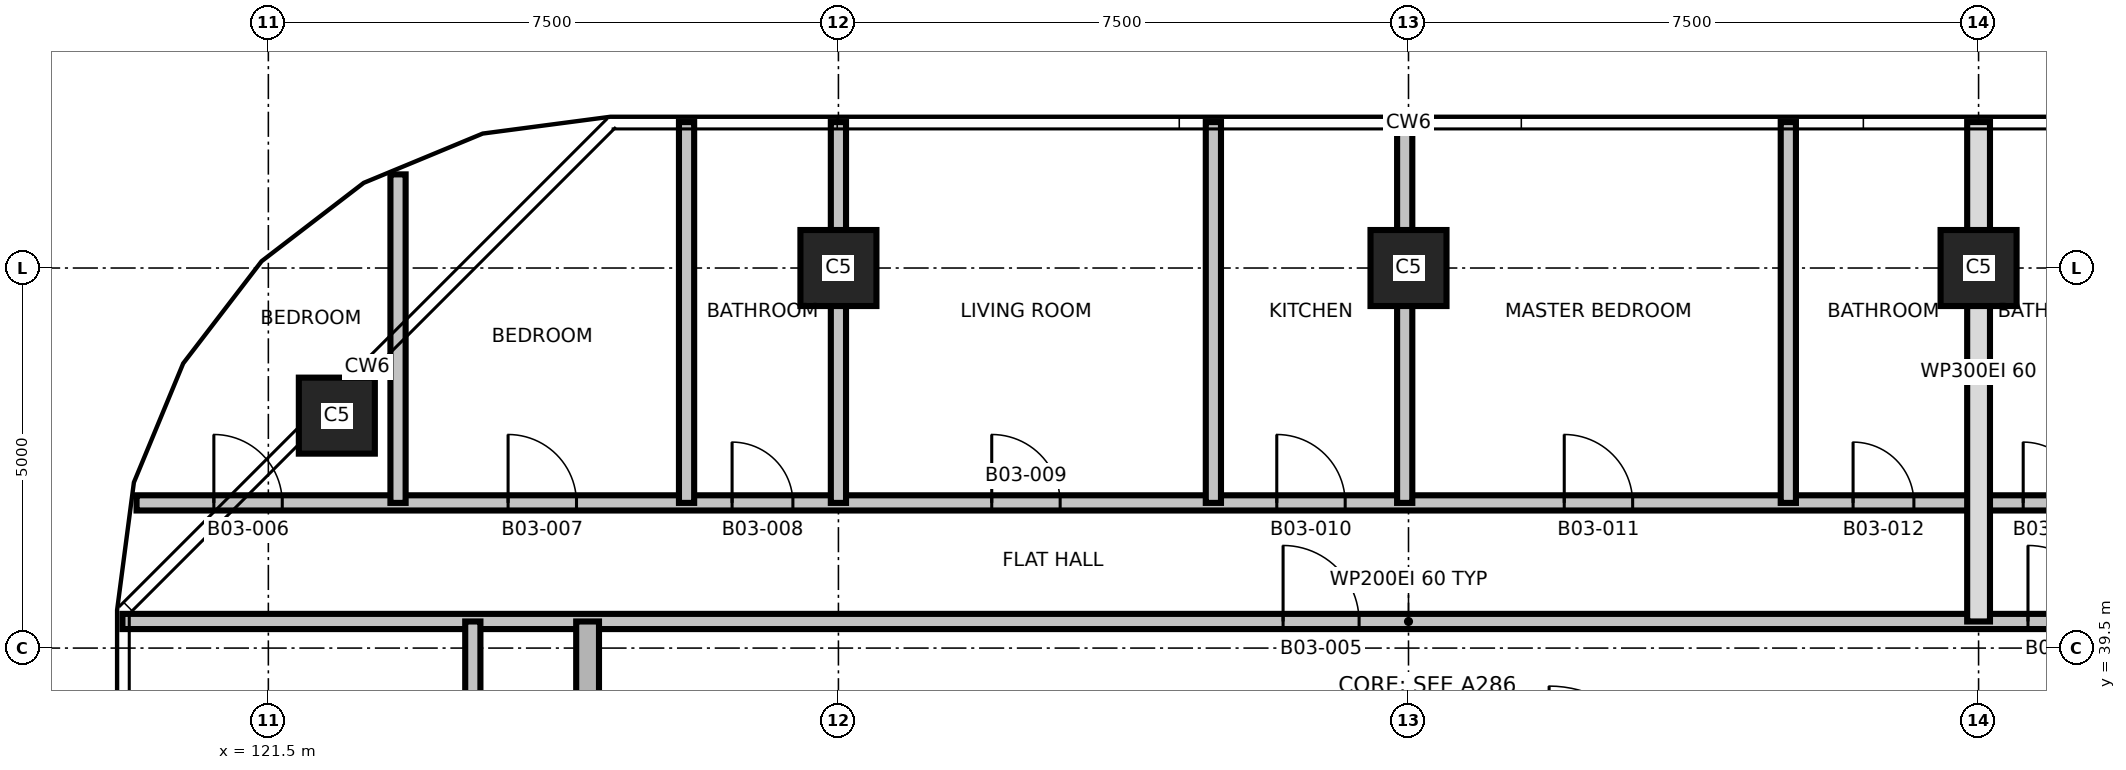
"""IFC4 building model, lengths in metres.
Left out: names, types, materials, properties, quantities, classifications, styles, units other than length and angle.
Written with IfcOpenShell. Run it as: python <this file> out.ifc"""

import sys

from ifc_helpers import new_model, si_unit, direction, frame, frame_2d, origin, origin_2d, place, context, subcontext, project, spatial, rectangle, extrude, element, fill, save


model = new_model("IFC4")
c1 = context("Model", 3, precision=1e-05, world=origin(), true_north=direction((0.0, 1.0)))
c2 = subcontext(c1, "Body", "Model", "MODEL_VIEW")
j1 = project(units=[si_unit("LENGTHUNIT", "METRE"), si_unit("PLANEANGLEUNIT", "RADIAN")], contexts=[c1])
p1 = place(None, origin())
s1 = spatial("IfcSite", under=j1, at=p1, CompositionType="ELEMENT")
p2 = place(p1, origin())
s2 = spatial("IfcBuilding", under=s1, at=p2, CompositionType="ELEMENT")
p3 = place(p2, frame((0.0, 0.0, 55.7)))
s3 = spatial("IfcBuildingStorey", under=s2, at=p3, CompositionType="ELEMENT", Elevation=55.7)
for number, where, z_axis, x_axis in (
    (1, (122.401, 42.558, 0.0), (0.0, 0.0, 1.0), (1.0, 0.0, 0.0)),
    (2, (129.0, 44.5, 0.0), (0.0, 0.0, 1.0), (1.0, 0.0, 0.0)),
    (3, (136.5, 44.5, 0.0), (0.0, 0.0, 1.0), (1.0, 0.0, 0.0)),
    (4, (144.0, 44.5, 0.0), (0.0, 0.0, 1.0), (1.0, 0.0, 0.0)),
):
    element("IfcColumn", number, at=place(p3, frame(where, z_axis=z_axis, x_axis=x_axis)), inside=s3, PredefinedType="COLUMN", context=c2, shape_type="SweptSolid", body=[
        extrude(rectangle(XDim=1.0, YDim=1.0, at=origin_2d()), origin(), (0.0, 0.0, 1.0), 3.7),
    ])
p4 = place(p3, frame((119.58, 39.85, 0.0), z_axis=(0.0, 0.0, 1.0), x_axis=(1.0, 0.0, 0.0)))
e5 = element("IfcWall", 5, at=p4, inside=s3, PredefinedType="PARTITIONING", context=c2, shape_type="SweptSolid", body=[
    extrude(rectangle(XDim=33.84, YDim=0.2, at=frame_2d((16.92, 0.0))), origin(), (0.0, 0.0, 1.0), 3.4),
])
p5 = place(p4, frame((15.27, 0.0, 0.0)))
e6 = element("IfcOpeningElement", 6, at=p5, cuts=e5, PredefinedType="OPENING", context=c2, shape_type="SweptSolid", body=[
    extrude(rectangle(XDim=1.0, YDim=2.1, at=frame_2d((0.5, 1.05))), frame((0.0, 0.11, 0.0), z_axis=(0.0, -1.0, 0.0), x_axis=(1.0, 0.0, 0.0)), (0.0, 0.0, 1.0), 0.22),
])
p6 = place(p4, frame((25.07, 0.0, 0.0)))
e7 = element("IfcOpeningElement", 7, at=p6, cuts=e5, PredefinedType="OPENING", context=c2, shape_type="SweptSolid", body=[
    extrude(rectangle(XDim=1.0, YDim=2.1, at=frame_2d((0.5, 1.05))), frame((0.0, 0.11, 0.0), z_axis=(0.0, -1.0, 0.0), x_axis=(1.0, 0.0, 0.0)), (0.0, 0.0, 1.0), 0.22),
])
p7 = place(p3, frame((119.766, 41.41, 0.0), z_axis=(0.0, 0.0, 1.0), x_axis=(1.0, 0.0, 0.0)))
e8 = element("IfcWall", 8, at=p7, inside=s3, PredefinedType="PARTITIONING", context=c2, shape_type="SweptSolid", body=[
    extrude(rectangle(XDim=33.468, YDim=0.2, at=frame_2d((16.734, 0.0))), origin(), (0.0, 0.0, 1.0), 3.4),
])
p8 = place(p7, frame((1.017, 0.0, 0.0)))
e9 = element("IfcOpeningElement", 9, at=p8, cuts=e8, PredefinedType="OPENING", context=c2, shape_type="SweptSolid", body=[
    extrude(rectangle(XDim=0.9, YDim=2.1, at=frame_2d((0.45, 1.05))), frame((0.0, 0.11, 0.0), z_axis=(0.0, -1.0, 0.0), x_axis=(1.0, 0.0, 0.0)), (0.0, 0.0, 1.0), 0.22),
])
p9 = place(p7, frame((4.888, 0.0, 0.0)))
e10 = element("IfcOpeningElement", 10, at=p9, cuts=e8, PredefinedType="OPENING", context=c2, shape_type="SweptSolid", body=[
    extrude(rectangle(XDim=0.9, YDim=2.1, at=frame_2d((0.45, 1.05))), frame((0.0, 0.11, 0.0), z_axis=(0.0, -1.0, 0.0), x_axis=(1.0, 0.0, 0.0)), (0.0, 0.0, 1.0), 0.22),
])
p10 = place(p7, frame((7.835, 0.0, 0.0)))
e11 = element("IfcOpeningElement", 11, at=p10, cuts=e8, PredefinedType="OPENING", context=c2, shape_type="SweptSolid", body=[
    extrude(rectangle(XDim=0.8, YDim=2.1, at=frame_2d((0.4, 1.05))), frame((0.0, 0.11, 0.0), z_axis=(0.0, -1.0, 0.0), x_axis=(1.0, 0.0, 0.0)), (0.0, 0.0, 1.0), 0.22),
])
p11 = place(p7, frame((11.251, 0.0, 0.0)))
e12 = element("IfcOpeningElement", 12, at=p11, cuts=e8, PredefinedType="OPENING", context=c2, shape_type="SweptSolid", body=[
    extrude(rectangle(XDim=0.9, YDim=2.1, at=frame_2d((0.45, 1.05))), frame((0.0, 0.11, 0.0), z_axis=(0.0, -1.0, 0.0), x_axis=(1.0, 0.0, 0.0)), (0.0, 0.0, 1.0), 0.22),
])
p12 = place(p7, frame((15.001, 0.0, 0.0)))
e13 = element("IfcOpeningElement", 13, at=p12, cuts=e8, PredefinedType="OPENING", context=c2, shape_type="SweptSolid", body=[
    extrude(rectangle(XDim=0.9, YDim=2.1, at=frame_2d((0.45, 1.05))), frame((0.0, 0.11, 0.0), z_axis=(0.0, -1.0, 0.0), x_axis=(1.0, 0.0, 0.0)), (0.0, 0.0, 1.0), 0.22),
])
p13 = place(p7, frame((18.783, 0.0, 0.0)))
e14 = element("IfcOpeningElement", 14, at=p13, cuts=e8, PredefinedType="OPENING", context=c2, shape_type="SweptSolid", body=[
    extrude(rectangle(XDim=0.9, YDim=2.1, at=frame_2d((0.45, 1.05))), frame((0.0, 0.11, 0.0), z_axis=(0.0, -1.0, 0.0), x_axis=(1.0, 0.0, 0.0)), (0.0, 0.0, 1.0), 0.22),
])
p14 = place(p7, frame((22.583, 0.0, 0.0)))
e15 = element("IfcOpeningElement", 15, at=p14, cuts=e8, PredefinedType="OPENING", context=c2, shape_type="SweptSolid", body=[
    extrude(rectangle(XDim=0.8, YDim=2.1, at=frame_2d((0.4, 1.05))), frame((0.0, 0.11, 0.0), z_axis=(0.0, -1.0, 0.0), x_axis=(1.0, 0.0, 0.0)), (0.0, 0.0, 1.0), 0.22),
])
p15 = place(p7, frame((24.821, 0.0, 0.0)))
e16 = element("IfcOpeningElement", 16, at=p15, cuts=e8, PredefinedType="OPENING", context=c2, shape_type="SweptSolid", body=[
    extrude(rectangle(XDim=0.8, YDim=2.1, at=frame_2d((0.4, 1.05))), frame((0.0, 0.11, 0.0), z_axis=(0.0, -1.0, 0.0), x_axis=(1.0, 0.0, 0.0)), (0.0, 0.0, 1.0), 0.22),
])
p16 = place(p7, frame((26.923, 0.0, 0.0)))
e17 = element("IfcOpeningElement", 17, at=p16, cuts=e8, PredefinedType="OPENING", context=c2, shape_type="SweptSolid", body=[
    extrude(rectangle(XDim=0.9, YDim=2.1, at=frame_2d((0.45, 1.05))), frame((0.0, 0.11, 0.0), z_axis=(0.0, -1.0, 0.0), x_axis=(1.0, 0.0, 0.0)), (0.0, 0.0, 1.0), 0.22),
])
p17 = place(p7, frame((31.556, 0.0, 0.0)))
e18 = element("IfcOpeningElement", 18, at=p17, cuts=e8, PredefinedType="OPENING", context=c2, shape_type="SweptSolid", body=[
    extrude(rectangle(XDim=0.9, YDim=2.1, at=frame_2d((0.45, 1.05))), frame((0.0, 0.11, 0.0), z_axis=(0.0, -1.0, 0.0), x_axis=(1.0, 0.0, 0.0)), (0.0, 0.0, 1.0), 0.22),
])
p18 = place(p3, frame((123.206, 41.41, 0.0), z_axis=(0.0, 0.0, 1.0), x_axis=(0.0, 1.0, 0.0)))
e19 = element("IfcWall", 19, at=p18, inside=s3, PredefinedType="PARTITIONING", context=c2, shape_type="SweptSolid", body=[
    extrude(rectangle(XDim=4.322, YDim=0.2, at=frame_2d((2.161, 0.0))), origin(), (0.0, 0.0, 1.0), 3.4),
])
p19 = place(p3, frame((124.19, 22.15, 0.0), z_axis=(0.0, 0.0, 1.0), x_axis=(0.0, 1.0, 0.0)))
e20 = element("IfcWall", 20, at=p19, inside=s3, PredefinedType="PARTITIONING", context=c2, shape_type="SweptSolid", body=[
    extrude(rectangle(XDim=17.7, YDim=0.2, at=frame_2d((8.85, 0.0))), origin(), (0.0, 0.0, 1.0), 3.4),
])
p20 = place(p19, frame((1.028, 0.0, 0.0)))
e21 = element("IfcOpeningElement", 21, at=p20, cuts=e20, PredefinedType="OPENING", context=c2, shape_type="SweptSolid", body=[
    extrude(rectangle(XDim=0.9, YDim=2.1, at=frame_2d((0.45, 1.05))), frame((0.0, 0.11, 0.0), z_axis=(0.0, -1.0, 0.0), x_axis=(1.0, 0.0, 0.0)), (0.0, 0.0, 1.0), 0.22),
])
p21 = place(p19, frame((3.253, 0.0, 0.0)))
e22 = element("IfcOpeningElement", 22, at=p21, cuts=e20, PredefinedType="OPENING", context=c2, shape_type="SweptSolid", body=[
    extrude(rectangle(XDim=0.8, YDim=2.1, at=frame_2d((0.4, 1.05))), frame((0.0, 0.11, 0.0), z_axis=(0.0, -1.0, 0.0), x_axis=(1.0, 0.0, 0.0)), (0.0, 0.0, 1.0), 0.22),
])
p22 = place(p19, frame((6.867, 0.0, 0.0)))
e23 = element("IfcOpeningElement", 23, at=p22, cuts=e20, PredefinedType="OPENING", context=c2, shape_type="SweptSolid", body=[
    extrude(rectangle(XDim=0.9, YDim=2.1, at=frame_2d((0.45, 1.05))), frame((0.0, 0.11, 0.0), z_axis=(0.0, -1.0, 0.0), x_axis=(1.0, 0.0, 0.0)), (0.0, 0.0, 1.0), 0.22),
])
p23 = place(p19, frame((11.367, 0.0, 0.0)))
e24 = element("IfcOpeningElement", 24, at=p23, cuts=e20, PredefinedType="OPENING", context=c2, shape_type="SweptSolid", body=[
    extrude(rectangle(XDim=0.9, YDim=2.1, at=frame_2d((0.45, 1.05))), frame((0.0, 0.11, 0.0), z_axis=(0.0, -1.0, 0.0), x_axis=(1.0, 0.0, 0.0)), (0.0, 0.0, 1.0), 0.22),
])
p24 = place(p19, frame((15.075, 0.0, 0.0)))
e25 = element("IfcOpeningElement", 25, at=p24, cuts=e20, PredefinedType="OPENING", context=c2, shape_type="SweptSolid", body=[
    extrude(rectangle(XDim=0.9, YDim=2.1, at=frame_2d((0.45, 1.05))), frame((0.0, 0.11, 0.0), z_axis=(0.0, -1.0, 0.0), x_axis=(1.0, 0.0, 0.0)), (0.0, 0.0, 1.0), 0.22),
])
p25 = place(p3, frame((125.7, 22.15, 0.0), z_axis=(0.0, 0.0, 1.0), x_axis=(0.0, 1.0, 0.0)))
e26 = element("IfcWall", 26, at=p25, inside=s3, PredefinedType="SHEAR", context=c2, shape_type="SweptSolid", body=[
    extrude(rectangle(XDim=17.7, YDim=0.3, at=frame_2d((8.85, 0.0))), origin(), (0.0, 0.0, 1.0), 3.4),
])
p26 = place(p25, frame((2.7, 0.0, 0.0)))
e27 = element("IfcOpeningElement", 27, at=p26, cuts=e26, PredefinedType="OPENING", context=c2, shape_type="SweptSolid", body=[
    extrude(rectangle(XDim=1.0, YDim=2.1, at=frame_2d((0.5, 1.05))), frame((0.0, 0.16, 0.0), z_axis=(0.0, -1.0, 0.0), x_axis=(1.0, 0.0, 0.0)), (0.0, 0.0, 1.0), 0.32),
])
for number, where, z_axis, x_axis in (
    (28, (127.002, 41.41, 0.0), (0.0, 0.0, 1.0), (0.0, 1.0, 0.0)),
    (29, (129.0, 41.41, 0.0), (0.0, 0.0, 1.0), (0.0, 1.0, 0.0)),
    (30, (133.933, 41.41, 0.0), (0.0, 0.0, 1.0), (0.0, 1.0, 0.0)),
    (31, (136.45, 41.41, 0.0), (0.0, 0.0, 1.0), (0.0, 1.0, 0.0)),
    (32, (141.497, 41.41, 0.0), (0.0, 0.0, 1.0), (0.0, 1.0, 0.0)),
):
    element("IfcWall", number, at=place(p3, frame(where, z_axis=z_axis, x_axis=x_axis)), inside=s3, PredefinedType="PARTITIONING", context=c2, shape_type="SweptSolid", body=[
        extrude(rectangle(XDim=5.01, YDim=0.2, at=frame_2d((2.505, 0.0))), origin(), (0.0, 0.0, 1.0), 3.4),
    ])
p27 = place(p3, frame((144.0, 39.85, 0.0), z_axis=(0.0, 0.0, 1.0), x_axis=(0.0, 1.0, 0.0)))
e33 = element("IfcWall", 33, at=p27, inside=s3, PredefinedType="PARTITIONING", context=c2, shape_type="SweptSolid", body=[
    extrude(rectangle(XDim=6.57, YDim=0.3, at=frame_2d((3.285, 0.0))), origin(), (0.0, 0.0, 1.0), 3.4),
])
p28 = place(p5, origin())
e34 = element("IfcDoor", 34, at=p28, inside=s3, OperationType="SINGLE_SWING_LEFT", PredefinedType="DOOR", context=c2, shape_type="SweptSolid", body=[
    extrude(rectangle(XDim=1.0, YDim=2.1, at=frame_2d((0.5, 1.05))), frame((0.0, 0.025, 0.0), z_axis=(0.0, -1.0, 0.0), x_axis=(1.0, 0.0, 0.0)), (0.0, 0.0, 1.0), 0.05),
])
fill(e6, e34)
p29 = place(p8, origin())
e35 = element("IfcDoor", 35, at=p29, inside=s3, OperationType="SINGLE_SWING_RIGHT", PredefinedType="DOOR", context=c2, shape_type="SweptSolid", body=[
    extrude(rectangle(XDim=0.9, YDim=2.1, at=frame_2d((0.45, 1.05))), frame((0.0, 0.025, 0.0), z_axis=(0.0, -1.0, 0.0), x_axis=(1.0, 0.0, 0.0)), (0.0, 0.0, 1.0), 0.05),
])
fill(e9, e35)
p30 = place(p9, origin())
e36 = element("IfcDoor", 36, at=p30, inside=s3, OperationType="SINGLE_SWING_LEFT", PredefinedType="DOOR", context=c2, shape_type="SweptSolid", body=[
    extrude(rectangle(XDim=0.9, YDim=2.1, at=frame_2d((0.45, 1.05))), frame((0.0, 0.025, 0.0), z_axis=(0.0, -1.0, 0.0), x_axis=(1.0, 0.0, 0.0)), (0.0, 0.0, 1.0), 0.05),
])
fill(e10, e36)
p31 = place(p10, origin())
e37 = element("IfcDoor", 37, at=p31, inside=s3, OperationType="SINGLE_SWING_RIGHT", PredefinedType="DOOR", context=c2, shape_type="SweptSolid", body=[
    extrude(rectangle(XDim=0.8, YDim=2.1, at=frame_2d((0.4, 1.05))), frame((0.0, 0.025, 0.0), z_axis=(0.0, -1.0, 0.0), x_axis=(1.0, 0.0, 0.0)), (0.0, 0.0, 1.0), 0.05),
])
fill(e11, e37)
p32 = place(p11, origin())
e38 = element("IfcDoor", 38, at=p32, inside=s3, OperationType="SINGLE_SWING_LEFT", PredefinedType="DOOR", context=c2, shape_type="SweptSolid", body=[
    extrude(rectangle(XDim=0.9, YDim=2.1, at=frame_2d((0.45, 1.05))), frame((0.0, 0.025, 0.0), z_axis=(0.0, -1.0, 0.0), x_axis=(1.0, 0.0, 0.0)), (0.0, 0.0, 1.0), 0.05),
])
fill(e12, e38)
p33 = place(p12, origin())
e39 = element("IfcDoor", 39, at=p33, inside=s3, OperationType="SINGLE_SWING_RIGHT", PredefinedType="DOOR", context=c2, shape_type="SweptSolid", body=[
    extrude(rectangle(XDim=0.9, YDim=2.1, at=frame_2d((0.45, 1.05))), frame((0.0, 0.025, 0.0), z_axis=(0.0, -1.0, 0.0), x_axis=(1.0, 0.0, 0.0)), (0.0, 0.0, 1.0), 0.05),
])
fill(e13, e39)
p34 = place(p13, origin())
e40 = element("IfcDoor", 40, at=p34, inside=s3, OperationType="SINGLE_SWING_LEFT", PredefinedType="DOOR", context=c2, shape_type="SweptSolid", body=[
    extrude(rectangle(XDim=0.9, YDim=2.1, at=frame_2d((0.45, 1.05))), frame((0.0, 0.025, 0.0), z_axis=(0.0, -1.0, 0.0), x_axis=(1.0, 0.0, 0.0)), (0.0, 0.0, 1.0), 0.05),
])
fill(e14, e40)
p35 = place(p14, origin())
e41 = element("IfcDoor", 41, at=p35, inside=s3, OperationType="SINGLE_SWING_RIGHT", PredefinedType="DOOR", context=c2, shape_type="SweptSolid", body=[
    extrude(rectangle(XDim=0.8, YDim=2.1, at=frame_2d((0.4, 1.05))), frame((0.0, 0.025, 0.0), z_axis=(0.0, -1.0, 0.0), x_axis=(1.0, 0.0, 0.0)), (0.0, 0.0, 1.0), 0.05),
])
fill(e15, e41)
p36 = place(p6, origin())
e42 = element("IfcDoor", 42, at=p36, inside=s3, OperationType="SINGLE_SWING_LEFT", PredefinedType="DOOR", context=c2, shape_type="SweptSolid", body=[
    extrude(rectangle(XDim=1.0, YDim=2.1, at=frame_2d((0.5, 1.05))), frame((0.0, 0.025, 0.0), z_axis=(0.0, -1.0, 0.0), x_axis=(1.0, 0.0, 0.0)), (0.0, 0.0, 1.0), 0.05),
])
fill(e7, e42)
p37 = place(p15, origin())
e43 = element("IfcDoor", 43, at=p37, inside=s3, OperationType="SINGLE_SWING_RIGHT", PredefinedType="DOOR", context=c2, shape_type="SweptSolid", body=[
    extrude(rectangle(XDim=0.8, YDim=2.1, at=frame_2d((0.4, 1.05))), frame((0.0, 0.025, 0.0), z_axis=(0.0, -1.0, 0.0), x_axis=(1.0, 0.0, 0.0)), (0.0, 0.0, 1.0), 0.05),
])
fill(e16, e43)
save(model, sys.argv[1])
